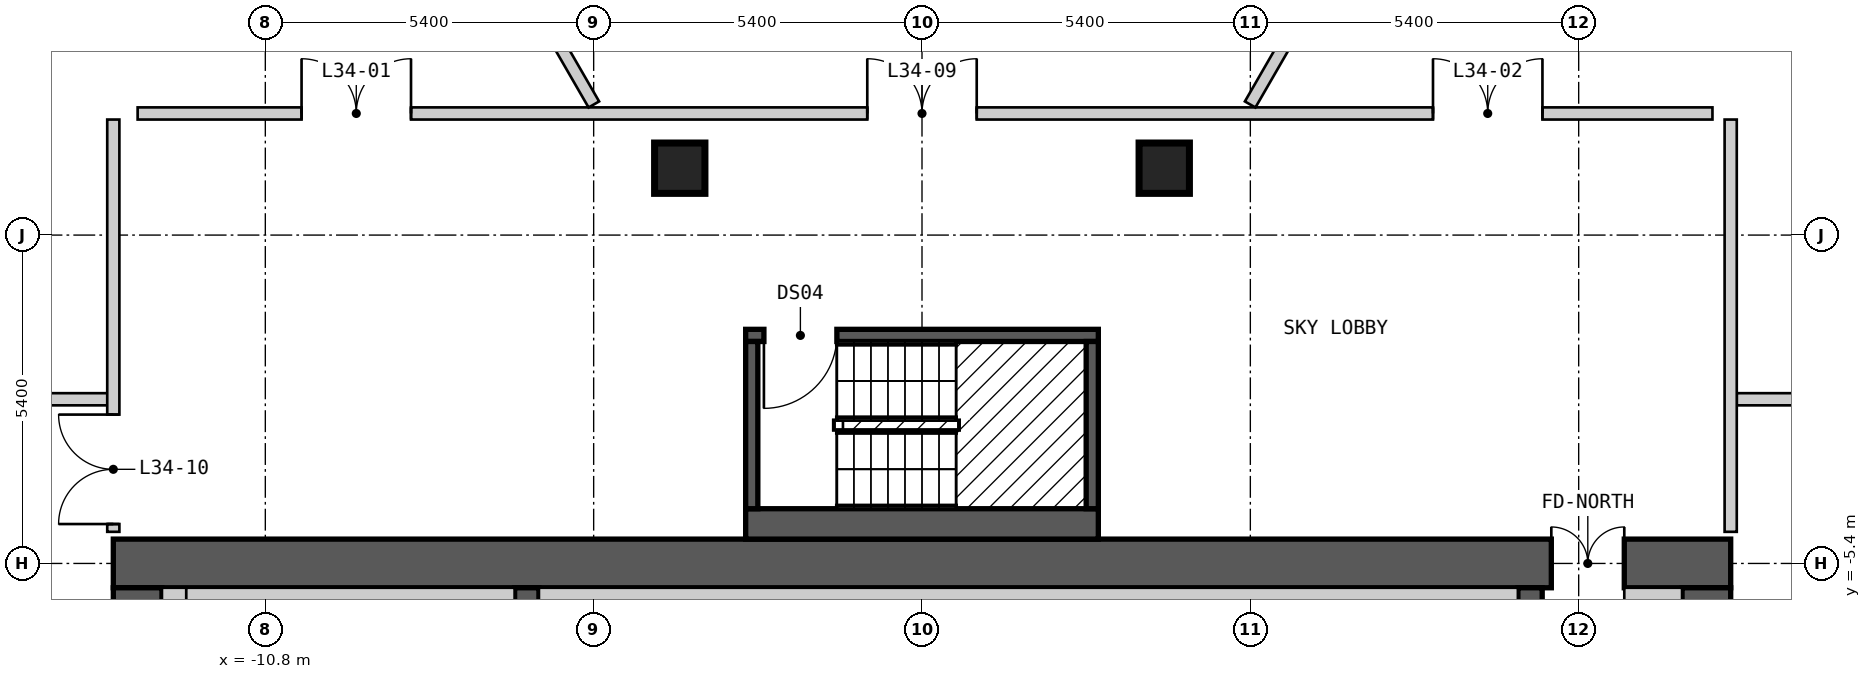
"""IFC4 building model, lengths in metres.
Left out: names, types, materials, properties, quantities, classifications, styles, units other than length and angle.
Written with IfcOpenShell. Run it as: python <this file> out.ifc"""

import sys

from ifc_helpers import new_model, si_unit, direction, frame, frame_2d, origin, origin_2d, place, context, subcontext, project, spatial, rectangle, extrude, element, fill, save


model = new_model("IFC4")
c1 = context("Model", 3, precision=1e-05, world=origin(), true_north=direction((0.0, 1.0)))
c2 = subcontext(c1, "Body", "Model", "MODEL_VIEW")
j1 = project(units=[si_unit("LENGTHUNIT", "METRE"), si_unit("PLANEANGLEUNIT", "RADIAN")], contexts=[c1])
p1 = place(None, origin())
s1 = spatial("IfcSite", under=j1, at=p1, CompositionType="ELEMENT")
p2 = place(p1, origin())
s2 = spatial("IfcBuilding", under=s1, at=p2, CompositionType="ELEMENT")
p3 = place(p2, frame((0.0, 0.0, 111.6)))
s3 = spatial("IfcBuildingStorey", under=s2, at=p3, CompositionType="ELEMENT", Elevation=111.6)
for number, where, z_axis, x_axis in (
    (1, (3.984, 1.1, 0.0), (0.0, 0.0, 1.0), (1.0, 0.0, 0.0)),
    (2, (-3.984, 1.1, 0.0), (0.0, 0.0, 1.0), (1.0, 0.0, 0.0)),
):
    element("IfcColumn", number, at=place(p3, frame(where, z_axis=z_axis, x_axis=x_axis)), inside=s3, PredefinedType="COLUMN", context=c2, shape_type="SweptSolid", body=[
        extrude(rectangle(XDim=0.8, YDim=0.8, at=origin_2d()), origin(), (0.0, 0.0, 1.0), 6.0),
    ])
p4 = place(p3, frame((-13.3, -5.4, 0.0), z_axis=(0.0, 0.0, 1.0), x_axis=(1.0, 0.0, 0.0)))
e3 = element("IfcWall", 3, at=p4, inside=s3, PredefinedType="SHEAR", context=c2, shape_type="SweptSolid", body=[
    extrude(rectangle(XDim=26.6, YDim=0.8, at=frame_2d((13.3, 0.0))), origin(), (0.0, 0.0, 1.0), 5.7),
])
p5 = place(p4, frame((23.65, 0.0, 0.0)))
e4 = element("IfcOpeningElement", 4, at=p5, cuts=e3, PredefinedType="OPENING", context=c2, shape_type="SweptSolid", body=[
    extrude(rectangle(XDim=1.2, YDim=2.1, at=frame_2d((0.6, 1.05))), frame((0.0, 0.41, 0.0), z_axis=(0.0, -1.0, 0.0), x_axis=(1.0, 0.0, 0.0)), (0.0, 0.0, 1.0), 0.82),
])
p6 = place(p3, frame((-12.9, -18.2, 0.0), z_axis=(0.0, 0.0, 1.0), x_axis=(0.0, 1.0, 0.0)))
e5 = element("IfcWall", 5, at=p6, inside=s3, PredefinedType="SHEAR", context=c2, shape_type="SweptSolid", body=[
    extrude(rectangle(XDim=12.4, YDim=0.8, at=frame_2d((6.2, 0.0))), origin(), (0.0, 0.0, 1.0), 5.7),
])
p7 = place(p6, frame((4.0, 0.0, 0.0)))
e6 = element("IfcOpeningElement", 6, at=p7, cuts=e5, PredefinedType="OPENING", context=c2, shape_type="SweptSolid", body=[
    extrude(rectangle(XDim=1.2, YDim=2.1, at=frame_2d((0.6, 1.05))), frame((0.0, 0.41, 0.0), z_axis=(0.0, -1.0, 0.0), x_axis=(1.0, 0.0, 0.0)), (0.0, 0.0, 1.0), 0.82),
])
p8 = place(p3, frame((12.9, -18.2, 0.0), z_axis=(0.0, 0.0, 1.0), x_axis=(0.0, 1.0, 0.0)))
e7 = element("IfcWall", 7, at=p8, inside=s3, PredefinedType="SHEAR", context=c2, shape_type="SweptSolid", body=[
    extrude(rectangle(XDim=12.4, YDim=0.8, at=frame_2d((6.2, 0.0))), origin(), (0.0, 0.0, 1.0), 5.7),
])
for number, where, z_axis, x_axis in (
    (8, (-6.5, -9.15, 0.0), (0.0, 0.0, 1.0), (0.0, 1.0, 0.0)),
    (9, (10.0, -9.15, 0.0), (0.0, 0.0, 1.0), (0.0, 1.0, 0.0)),
):
    element("IfcWall", number, at=place(p3, frame(where, z_axis=z_axis, x_axis=x_axis)), inside=s3, PredefinedType="SHEAR", context=c2, shape_type="SweptSolid", body=[
        extrude(rectangle(XDim=3.35, YDim=0.4, at=frame_2d((1.675, 0.0))), origin(), (0.0, 0.0, 1.0), 5.7),
    ])
p9 = place(p3, frame((-2.9, -4.75, 0.0), z_axis=(0.0, 0.0, 1.0), x_axis=(1.0, 0.0, 0.0)))
e10 = element("IfcWall", 10, at=p9, inside=s3, PredefinedType="SOLIDWALL", context=c2, shape_type="SweptSolid", body=[
    extrude(rectangle(XDim=5.8, YDim=0.5, at=frame_2d((2.9, 0.0))), origin(), (0.0, 0.0, 1.0), 5.7),
])
p10 = place(p3, frame((-2.9, -1.65, 0.0), z_axis=(0.0, 0.0, 1.0), x_axis=(1.0, 0.0, 0.0)))
e11 = element("IfcWall", 11, at=p10, inside=s3, PredefinedType="SOLIDWALL", context=c2, shape_type="SweptSolid", body=[
    extrude(rectangle(XDim=5.8, YDim=0.2, at=frame_2d((2.9, 0.0))), origin(), (0.0, 0.0, 1.0), 5.7),
])
p11 = place(p10, frame((0.3, 0.0, 0.0)))
e12 = element("IfcOpeningElement", 12, at=p11, cuts=e11, PredefinedType="OPENING", context=c2, shape_type="SweptSolid", body=[
    extrude(rectangle(XDim=1.2, YDim=2.1, at=frame_2d((0.6, 1.05))), frame((0.0, 0.11, 0.0), z_axis=(0.0, -1.0, 0.0), x_axis=(1.0, 0.0, 0.0)), (0.0, 0.0, 1.0), 0.22),
])
for number, where, z_axis, x_axis in (
    (13, (-2.8, -4.5, 0.0), (0.0, 0.0, 1.0), (0.0, 1.0, 0.0)),
    (14, (2.8, -4.5, 0.0), (0.0, 0.0, 1.0), (0.0, 1.0, 0.0)),
):
    element("IfcWall", number, at=place(p3, frame(where, z_axis=z_axis, x_axis=x_axis)), inside=s3, PredefinedType="SOLIDWALL", context=c2, shape_type="SweptSolid", body=[
        extrude(rectangle(XDim=2.75, YDim=0.2, at=frame_2d((1.375, 0.0))), origin(), (0.0, 0.0, 1.0), 5.7),
    ])
for number, where, z_axis, x_axis in (
    (15, (-15.6, -2.7, 0.0), (0.0, 0.0, 1.0), (1.0, 0.0, 0.0)),
    (16, (13.4, -2.7, 0.0), (0.0, 0.0, 1.0), (1.0, 0.0, 0.0)),
):
    element("IfcWall", number, at=place(p3, frame(where, z_axis=z_axis, x_axis=x_axis)), inside=s3, PredefinedType="PARTITIONING", context=c2, shape_type="SweptSolid", body=[
        extrude(rectangle(XDim=2.3, YDim=0.2, at=frame_2d((1.15, 0.0))), origin(), (0.0, 0.0, 1.0), 5.7),
    ])
p12 = place(p3, frame((-12.9, 2.0, 0.0), z_axis=(0.0, 0.0, 1.0), x_axis=(1.0, 0.0, 0.0)))
e17 = element("IfcWall", 17, at=p12, inside=s3, PredefinedType="PARTITIONING", context=c2, shape_type="SweptSolid", body=[
    extrude(rectangle(XDim=25.9, YDim=0.2, at=frame_2d((12.95, 0.0))), origin(), (0.0, 0.0, 1.0), 5.7),
])
p13 = place(p12, frame((2.696, 0.0, 0.0)))
e18 = element("IfcOpeningElement", 18, at=p13, cuts=e17, PredefinedType="OPENING", context=c2, shape_type="SweptSolid", body=[
    extrude(rectangle(XDim=1.8, YDim=2.1, at=frame_2d((0.9, 1.05))), frame((0.0, 0.11, 0.0), z_axis=(0.0, -1.0, 0.0), x_axis=(1.0, 0.0, 0.0)), (0.0, 0.0, 1.0), 0.22),
])
p14 = place(p12, frame((21.304, 0.0, 0.0)))
e19 = element("IfcOpeningElement", 19, at=p14, cuts=e17, PredefinedType="OPENING", context=c2, shape_type="SweptSolid", body=[
    extrude(rectangle(XDim=1.8, YDim=2.1, at=frame_2d((0.9, 1.05))), frame((0.0, 0.11, 0.0), z_axis=(0.0, -1.0, 0.0), x_axis=(1.0, 0.0, 0.0)), (0.0, 0.0, 1.0), 0.22),
])
p15 = place(p12, frame((12.0, 0.0, 0.0)))
e20 = element("IfcOpeningElement", 20, at=p15, cuts=e17, PredefinedType="OPENING", context=c2, shape_type="SweptSolid", body=[
    extrude(rectangle(XDim=1.8, YDim=2.1, at=frame_2d((0.9, 1.05))), frame((0.0, 0.11, 0.0), z_axis=(0.0, -1.0, 0.0), x_axis=(1.0, 0.0, 0.0)), (0.0, 0.0, 1.0), 0.22),
])
p16 = place(p3, frame((-13.3, -4.88, 0.0), z_axis=(0.0, 0.0, 1.0), x_axis=(0.0, 1.0, 0.0)))
e21 = element("IfcWall", 21, at=p16, inside=s3, PredefinedType="PARTITIONING", context=c2, shape_type="SweptSolid", body=[
    extrude(rectangle(XDim=6.78, YDim=0.2, at=frame_2d((3.39, 0.0))), origin(), (0.0, 0.0, 1.0), 5.7),
])
p17 = place(p16, frame((0.128, 0.0, 0.0)))
e22 = element("IfcOpeningElement", 22, at=p17, cuts=e21, PredefinedType="OPENING", context=c2, shape_type="SweptSolid", body=[
    extrude(rectangle(XDim=1.8, YDim=2.1, at=frame_2d((0.9, 1.05))), frame((0.0, 0.11, 0.0), z_axis=(0.0, -1.0, 0.0), x_axis=(1.0, 0.0, 0.0)), (0.0, 0.0, 1.0), 0.22),
])
p18 = place(p3, frame((13.3, -4.88, 0.0), z_axis=(0.0, 0.0, 1.0), x_axis=(0.0, 1.0, 0.0)))
e23 = element("IfcWall", 23, at=p18, inside=s3, PredefinedType="PARTITIONING", context=c2, shape_type="SweptSolid", body=[
    extrude(rectangle(XDim=6.78, YDim=0.2, at=frame_2d((3.39, 0.0))), origin(), (0.0, 0.0, 1.0), 5.7),
])
p19 = place(p3, frame((-8.776, 8.0, 0.0), z_axis=(0.0, 0.0, 1.0), x_axis=(0.500024767483, -0.866011103799, 0.0)))
e24 = element("IfcWall", 24, at=p19, inside=s3, PredefinedType="PARTITIONING", context=c2, shape_type="SweptSolid", body=[
    extrude(rectangle(XDim=6.758, YDim=0.2, at=frame_2d((3.379, 0.0))), origin(), (0.0, 0.0, 1.0), 5.7),
])
p20 = place(p3, frame((5.397, 2.148, 0.0), z_axis=(0.0, 0.0, 1.0), x_axis=(0.499983511822, 0.866034923029, 0.0)))
e25 = element("IfcWall", 25, at=p20, inside=s3, PredefinedType="PARTITIONING", context=c2, shape_type="SweptSolid", body=[
    extrude(rectangle(XDim=6.584, YDim=0.2, at=frame_2d((3.292, 0.0))), origin(), (0.0, 0.0, 1.0), 5.7),
])
p21 = place(p3, frame((-12.3, -9.15, 0.0), z_axis=(0.0, 0.0, 1.0), x_axis=(0.0, 1.0, 0.0)))
e26 = element("IfcWall", 26, at=p21, inside=s3, PredefinedType="SOLIDWALL", context=c2, shape_type="SweptSolid", body=[
    extrude(rectangle(XDim=3.35, YDim=0.4, at=frame_2d((1.675, 0.0))), origin(), (0.0, 0.0, 1.0), 5.7),
])
p22 = place(p3, frame((-12.1, -6.0, 0.0), z_axis=(0.0, 0.0, 1.0), x_axis=(1.0, 0.0, 0.0)))
e27 = element("IfcWall", 27, at=p22, inside=s3, PredefinedType="SOLIDWALL", context=c2, shape_type="SweptSolid", body=[
    extrude(rectangle(XDim=5.4, YDim=0.4, at=frame_2d((2.7, 0.0))), origin(), (0.0, 0.0, 1.0), 5.7),
])
p23 = place(p3, frame((-6.3, -6.0, 0.0), z_axis=(0.0, 0.0, 1.0), x_axis=(1.0, 0.0, 0.0)))
e28 = element("IfcWall", 28, at=p23, inside=s3, PredefinedType="SOLIDWALL", context=c2, shape_type="SweptSolid", body=[
    extrude(rectangle(XDim=16.1, YDim=0.4, at=frame_2d((8.05, 0.0))), origin(), (0.0, 0.0, 1.0), 5.7),
])
p24 = place(p3, frame((11.55, -6.0, 0.0), z_axis=(0.0, 0.0, 1.0), x_axis=(1.0, 0.0, 0.0)))
e29 = element("IfcWall", 29, at=p24, inside=s3, PredefinedType="PARTITIONING", context=c2, shape_type="SweptSolid", body=[
    extrude(rectangle(XDim=0.95, YDim=0.4, at=frame_2d((0.475, 0.0))), origin(), (0.0, 0.0, 1.0), 5.7),
])
p25 = place(p11, origin())
e30 = element("IfcDoor", 30, at=p25, inside=s3, OperationType="SINGLE_SWING_LEFT", PredefinedType="DOOR", context=c2, shape_type="SweptSolid", body=[
    extrude(rectangle(XDim=1.2, YDim=2.1, at=frame_2d((0.6, 1.05))), frame((0.0, 0.025, 0.0), z_axis=(0.0, -1.0, 0.0), x_axis=(1.0, 0.0, 0.0)), (0.0, 0.0, 1.0), 0.05),
])
fill(e12, e30)
p26 = place(p13, origin())
e31 = element("IfcDoor", 31, at=p26, inside=s3, OperationType="DOUBLE_DOOR_SINGLE_SWING", PredefinedType="DOOR", context=c2, shape_type="SweptSolid", body=[
    extrude(rectangle(XDim=1.8, YDim=2.1, at=frame_2d((0.9, 1.05))), frame((0.0, 0.025, 0.0), z_axis=(0.0, -1.0, 0.0), x_axis=(1.0, 0.0, 0.0)), (0.0, 0.0, 1.0), 0.05),
])
fill(e18, e31)
p27 = place(p14, origin())
e32 = element("IfcDoor", 32, at=p27, inside=s3, OperationType="DOUBLE_DOOR_SINGLE_SWING", PredefinedType="DOOR", context=c2, shape_type="SweptSolid", body=[
    extrude(rectangle(XDim=1.8, YDim=2.1, at=frame_2d((0.9, 1.05))), frame((0.0, 0.025, 0.0), z_axis=(0.0, -1.0, 0.0), x_axis=(1.0, 0.0, 0.0)), (0.0, 0.0, 1.0), 0.05),
])
fill(e19, e32)
p28 = place(p15, origin())
e33 = element("IfcDoor", 33, at=p28, inside=s3, OperationType="DOUBLE_DOOR_SINGLE_SWING", PredefinedType="DOOR", context=c2, shape_type="SweptSolid", body=[
    extrude(rectangle(XDim=1.8, YDim=2.1, at=frame_2d((0.9, 1.05))), frame((0.0, 0.025, 0.0), z_axis=(0.0, -1.0, 0.0), x_axis=(1.0, 0.0, 0.0)), (0.0, 0.0, 1.0), 0.05),
])
fill(e20, e33)
p29 = place(p17, origin())
e34 = element("IfcDoor", 34, at=p29, inside=s3, OperationType="DOUBLE_DOOR_SINGLE_SWING", PredefinedType="DOOR", context=c2, shape_type="SweptSolid", body=[
    extrude(rectangle(XDim=1.8, YDim=2.1, at=frame_2d((0.9, 1.05))), frame((0.0, 0.025, 0.0), z_axis=(0.0, -1.0, 0.0), x_axis=(1.0, 0.0, 0.0)), (0.0, 0.0, 1.0), 0.05),
])
fill(e22, e34)
p30 = place(p5, origin())
e35 = element("IfcDoor", 35, at=p30, inside=s3, OperationType="DOUBLE_DOOR_SINGLE_SWING", PredefinedType="DOOR", context=c2, shape_type="SweptSolid", body=[
    extrude(rectangle(XDim=1.2, YDim=2.1, at=frame_2d((0.6, 1.05))), frame((0.0, 0.025, 0.0), z_axis=(0.0, -1.0, 0.0), x_axis=(1.0, 0.0, 0.0)), (0.0, 0.0, 1.0), 0.05),
])
fill(e4, e35)
save(model, sys.argv[1])
